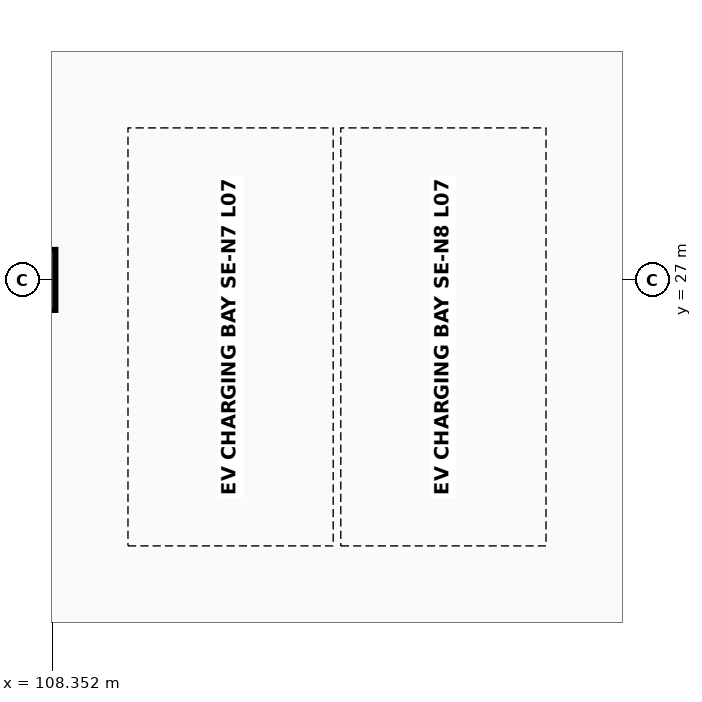
"""IFC4 building model, lengths in metres.
Left out: names, types, materials, properties, quantities, classifications, styles, units other than length and angle.
Written with IfcOpenShell. Run it as: python <this file> out.ifc"""

import sys

from ifc_helpers import new_model, si_unit, direction, frame, origin, origin_2d, place, context, subcontext, project, spatial, rectangle, extrude, element, save


model = new_model("IFC4")
c1 = context("Model", 3, precision=1e-05, world=origin(), true_north=direction((0.0, 1.0)))
c2 = subcontext(c1, "Body", "Model", "MODEL_VIEW")
j1 = project(units=[si_unit("LENGTHUNIT", "METRE"), si_unit("PLANEANGLEUNIT", "RADIAN")], contexts=[c1])
p1 = place(None, origin())
s1 = spatial("IfcSite", under=j1, at=p1, CompositionType="ELEMENT")
p2 = place(p1, origin())
s2 = spatial("IfcBuilding", under=s1, at=p2, CompositionType="ELEMENT")
p3 = place(p2, frame((0.0, 0.0, 28.6)))
s3 = spatial("IfcBuildingStorey", under=s2, at=p3, CompositionType="ELEMENT", Elevation=28.6)
p4 = place(p3, frame((108.0, 27.0, 0.0), z_axis=(0.0, 0.0, 1.0), x_axis=(1.0, 0.0, 0.0)))
e1 = element("IfcColumn", 1, at=p4, inside=s3, PredefinedType="COLUMN", context=c2, shape_type="SweptSolid", body=[
    extrude(rectangle(XDim=0.8, YDim=0.8, at=origin_2d()), origin(), (0.0, 0.0, 1.0), 3.8),
])
save(model, sys.argv[1])
